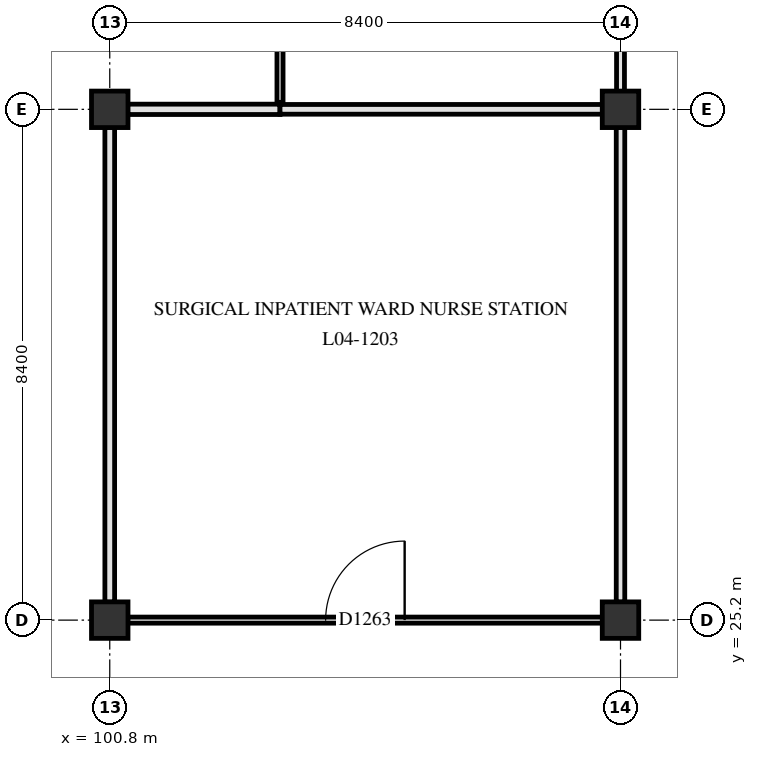
"""IFC4 building model, lengths in metres.
Left out: names, types, materials, properties, quantities, classifications, styles, units other than length and angle.
Written with IfcOpenShell. Run it as: python <this file> out.ifc"""

import sys

from ifc_helpers import new_model, si_unit, direction, frame, frame_2d, origin, origin_2d, place, context, subcontext, project, spatial, rectangle, extrude, element, fill, save


model = new_model("IFC4")
c1 = context("Model", 3, precision=1e-05, world=origin(), true_north=direction((0.0, 1.0)))
c2 = subcontext(c1, "Body", "Model", "MODEL_VIEW")
j1 = project(units=[si_unit("LENGTHUNIT", "METRE"), si_unit("PLANEANGLEUNIT", "RADIAN")], contexts=[c1])
p1 = place(None, origin())
s1 = spatial("IfcSite", under=j1, at=p1, CompositionType="ELEMENT")
p2 = place(p1, origin())
s2 = spatial("IfcBuilding", under=s1, at=p2, CompositionType="ELEMENT")
p3 = place(p2, frame((0.0, 0.0, 18.6)))
s3 = spatial("IfcBuildingStorey", under=s2, at=p3, CompositionType="ELEMENT", Elevation=18.6)
for number, where, z_axis, x_axis in (
    (1, (100.8, 25.2, 0.0), (0.0, 0.0, 1.0), (1.0, 0.0, 0.0)),
    (2, (100.8, 33.6, 0.0), (0.0, 0.0, 1.0), (1.0, 0.0, 0.0)),
    (3, (109.2, 25.2, 0.0), (0.0, 0.0, 1.0), (1.0, 0.0, 0.0)),
    (4, (109.2, 33.6, 0.0), (0.0, 0.0, 1.0), (1.0, 0.0, 0.0)),
):
    element("IfcColumn", number, at=place(p3, frame(where, z_axis=z_axis, x_axis=x_axis)), inside=s3, PredefinedType="COLUMN", context=c2, shape_type="SweptSolid", body=[
        extrude(rectangle(XDim=0.6, YDim=0.6, at=origin_2d()), origin(), (0.0, 0.0, 1.0), 3.9),
    ])
p4 = place(p3, frame((101.095, 25.2, 0.0), z_axis=(0.0, 0.0, 1.0), x_axis=(1.0, 0.0, 0.0)))
e5 = element("IfcWall", 5, at=p4, inside=s3, PredefinedType="PARTITIONING", context=c2, shape_type="SweptSolid", body=[
    extrude(rectangle(XDim=7.81, YDim=0.1, at=frame_2d((3.905, 0.0))), origin(), (0.0, 0.0, 1.0), 3.16),
])
p5 = place(p4, frame((3.255, 0.0, 0.0)))
e6 = element("IfcOpeningElement", 6, at=p5, cuts=e5, PredefinedType="OPENING", context=c2, shape_type="SweptSolid", body=[
    extrude(rectangle(XDim=1.3, YDim=2.2, at=frame_2d((0.65, 1.1))), frame((0.0, 0.06, 0.0), z_axis=(0.0, -1.0, 0.0), x_axis=(1.0, 0.0, 0.0)), (0.0, 0.0, 1.0), 0.12),
])
p6 = place(p3, frame((101.095, 33.6, 0.0), z_axis=(0.0, 0.0, 1.0), x_axis=(1.0, 0.0, 0.0)))
e7 = element("IfcWall", 7, at=p6, inside=s3, PredefinedType="PARTITIONING", context=c2, shape_type="SweptSolid", body=[
    extrude(rectangle(XDim=2.505, YDim=0.17, at=frame_2d((1.252, 0.0))), origin(), (0.0, 0.0, 1.0), 3.16),
])
p7 = place(p3, frame((103.6, 33.6, 0.0), z_axis=(0.0, 0.0, 1.0), x_axis=(1.0, 0.0, 0.0)))
e8 = element("IfcWall", 8, at=p7, inside=s3, PredefinedType="PARTITIONING", context=c2, shape_type="SweptSolid", body=[
    extrude(rectangle(XDim=5.305, YDim=0.16, at=frame_2d((2.652, 0.0))), origin(), (0.0, 0.0, 1.0), 3.16),
])
p8 = place(p3, frame((100.8, 25.495, 0.0), z_axis=(0.0, 0.0, 1.0), x_axis=(0.0, 1.0, 0.0)))
e9 = element("IfcWall", 9, at=p8, inside=s3, PredefinedType="PARTITIONING", context=c2, shape_type="SweptSolid", body=[
    extrude(rectangle(XDim=7.81, YDim=0.16, at=frame_2d((3.905, 0.0))), origin(), (0.0, 0.0, 1.0), 3.26),
])
p9 = place(p3, frame((103.6, 33.715, 0.0), z_axis=(0.0, 0.0, 1.0), x_axis=(0.0, 1.0, 0.0)))
e10 = element("IfcWall", 10, at=p9, inside=s3, PredefinedType="PARTITIONING", context=c2, shape_type="SweptSolid", body=[
    extrude(rectangle(XDim=3.97, YDim=0.1, at=frame_2d((1.985, 0.0))), origin(), (0.0, 0.0, 1.0), 3.31),
])
p10 = place(p9, frame((1.245, 0.0, 0.0)))
e11 = element("IfcOpeningElement", 11, at=p10, cuts=e10, PredefinedType="OPENING", context=c2, shape_type="SweptSolid", body=[
    extrude(rectangle(XDim=1.48, YDim=2.22, at=frame_2d((0.74, 1.11))), frame((0.0, 0.06, 0.0), z_axis=(0.0, -1.0, 0.0), x_axis=(1.0, 0.0, 0.0)), (0.0, 0.0, 1.0), 0.12),
])
p11 = place(p3, frame((109.2, 25.495, 0.0), z_axis=(0.0, 0.0, 1.0), x_axis=(0.0, 1.0, 0.0)))
e12 = element("IfcWall", 12, at=p11, inside=s3, PredefinedType="PARTITIONING", context=c2, shape_type="SweptSolid", body=[
    extrude(rectangle(XDim=7.81, YDim=0.14, at=frame_2d((3.905, 0.0))), origin(), (0.0, 0.0, 1.0), 3.26),
])
p12 = place(p3, frame((109.2, 33.895, 0.0), z_axis=(0.0, 0.0, 1.0), x_axis=(0.0, 1.0, 0.0)))
e13 = element("IfcWall", 13, at=p12, inside=s3, PredefinedType="PARTITIONING", context=c2, shape_type="SweptSolid", body=[
    extrude(rectangle(XDim=3.79, YDim=0.13, at=frame_2d((1.895, 0.0))), origin(), (0.0, 0.0, 1.0), 3.26),
])
p13 = place(p5, origin())
e14 = element("IfcDoor", 14, at=p13, inside=s3, OperationType="SINGLE_SWING_RIGHT", PredefinedType="DOOR", context=c2, shape_type="SweptSolid", body=[
    extrude(rectangle(XDim=1.3, YDim=2.2, at=frame_2d((0.65, 1.1))), frame((0.0, 0.025, 0.0), z_axis=(0.0, -1.0, 0.0), x_axis=(1.0, 0.0, 0.0)), (0.0, 0.0, 1.0), 0.05),
])
fill(e6, e14)
save(model, sys.argv[1])
